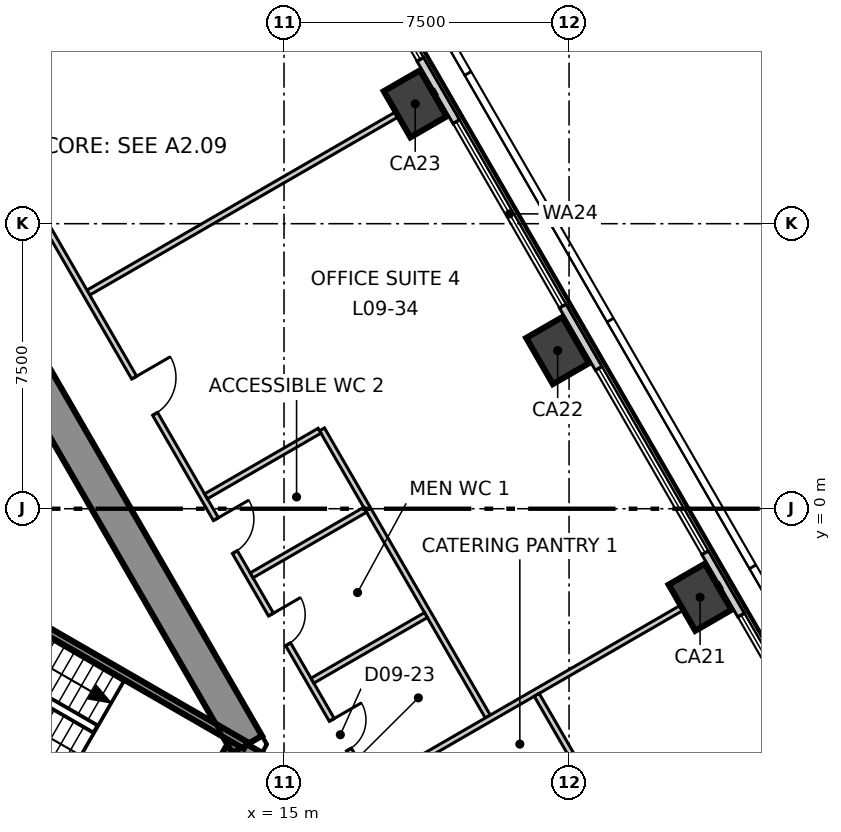
"""IFC4 building model, lengths in metres.
Left out: names, types, materials, properties, quantities, classifications, styles, units other than length and angle.
Written with IfcOpenShell. Run it as: python <this file> out.ifc"""

import sys

from ifc_helpers import new_model, si_unit, direction, frame, frame_2d, origin, origin_2d, place, context, subcontext, project, spatial, polyline, rectangle, outline, extrude, element, fill, save


model = new_model("IFC4")
c1 = context("Model", 3, precision=1e-05, world=origin(), true_north=direction((0.0, 1.0)))
c2 = subcontext(c1, "Body", "Model", "MODEL_VIEW")
j1 = project(units=[si_unit("LENGTHUNIT", "METRE"), si_unit("PLANEANGLEUNIT", "RADIAN")], contexts=[c1])
p1 = place(None, origin())
s1 = spatial("IfcSite", under=j1, at=p1, CompositionType="ELEMENT")
p2 = place(p1, origin())
s2 = spatial("IfcBuilding", under=s1, at=p2, CompositionType="ELEMENT")
p3 = place(p2, frame((0.0, 0.0, 47.3)))
s3 = spatial("IfcBuildingStorey", under=s2, at=p3, CompositionType="ELEMENT", Elevation=47.3)
p4 = place(p3, frame((12.384, -9.05, -0.3), z_axis=(0.0, 0.0, 1.0), x_axis=(0.500111984565, 0.865960739811, 0.0)))
e1 = element("IfcWall", 1, at=p4, inside=s3, PredefinedType="SHEAR", context=c2, shape_type="SweptSolid", body=[
    extrude(outline(polyline([(-0.26, -0.45), (1.646, -0.449), (3.551, -0.449), (3.031, 0.45), (1.646, 0.45), (0.26, 0.45), (-0.26, -0.45)])), origin(), (0.0, 0.0, 1.0), 4.0),
])
p5 = place(p4, frame((0.946, 0.0, 0.3)))
e2 = element("IfcOpeningElement", 2, at=p5, cuts=e1, PredefinedType="OPENING", context=c2, shape_type="SweptSolid", body=[
    extrude(rectangle(XDim=1.4, YDim=2.1, at=frame_2d((0.7, 1.05))), frame((0.0, 0.46, 0.0), z_axis=(0.0, -1.0, 0.0), x_axis=(1.0, 0.0, 0.0)), (0.0, 0.0, 1.0), 0.92),
])
p6 = place(p3, frame((14.03, -6.2, -0.3), z_axis=(0.0, 0.0, 1.0), x_axis=(-0.500026485275, 0.866010111964, 0.0)))
e3 = element("IfcWall", 3, at=p6, inside=s3, PredefinedType="SHEAR", context=c2, shape_type="SweptSolid", body=[
    extrude(outline(polyline([(-0.26, -0.449), (1.685, -0.449), (3.63, -0.449), (5.576, -0.449), (7.521, -0.449), (9.466, -0.449), (11.411, -0.449), (13.357, -0.449), (15.302, -0.449), (17.247, -0.45), (19.192, -0.45), (21.138, -0.45), (23.083, -0.45), (25.028, -0.45), (24.509, 0.449), (22.644, 0.449), (20.778, 0.449), (18.913, 0.449), (17.048, 0.449), (15.182, 0.449), (13.317, 0.449), (11.452, 0.449), (9.587, 0.449), (7.721, 0.45), (5.856, 0.45), (3.991, 0.45), (2.125, 0.45), (0.26, 0.45), (-0.26, -0.449)])), origin(), (0.0, 0.0, 1.0), 4.0),
])
p7 = place(p6, frame((11.484, 0.0, 0.3)))
e4 = element("IfcOpeningElement", 4, at=p7, cuts=e3, PredefinedType="OPENING", context=c2, shape_type="SweptSolid", body=[
    extrude(rectangle(XDim=1.8, YDim=2.1, at=frame_2d((0.9, 1.05))), frame((0.0, 0.46, 0.0), z_axis=(0.0, -1.0, 0.0), x_axis=(1.0, 0.0, 0.0)), (0.0, 0.0, 1.0), 0.92),
])
p8 = place(p6, frame((18.976, 0.0, 0.3)))
e5 = element("IfcOpeningElement", 5, at=p8, cuts=e3, PredefinedType="OPENING", context=c2, shape_type="SweptSolid", body=[
    extrude(rectangle(XDim=0.9, YDim=2.1, at=frame_2d((0.45, 1.05))), frame((0.0, 0.46, 0.0), z_axis=(0.0, -1.0, 0.0), x_axis=(1.0, 0.0, 0.0)), (0.0, 0.0, 1.0), 0.92),
])
for number, where, z_axis, x_axis in (
    (6, (25.948, -2.329, -0.3), (0.0, 0.0, 1.0), (-0.5, 0.866, 0.0)),
    (7, (22.2, 4.162, -0.3), (0.0, 0.0, 1.0), (-0.5, 0.866, 0.0)),
    (8, (18.452, 10.654, -0.3), (0.0, 0.0, 1.0), (-0.5, 0.866, 0.0)),
):
    element("IfcColumn", number, at=place(p3, frame(where, z_axis=z_axis, x_axis=x_axis)), inside=s3, PredefinedType="COLUMN", context=c2, shape_type="SweptSolid", body=[
        extrude(rectangle(XDim=1.4, YDim=1.1, at=origin_2d()), origin(), (0.0, 0.0, 1.0), 4.0),
    ])
p9 = place(p3, frame((34.701, -16.089, 0.0), z_axis=(0.0, 0.0, 1.0), x_axis=(-0.499998722828, 0.866026141159, 0.0)))
e9 = element("IfcWall", 9, at=p9, inside=s3, PredefinedType="ELEMENTEDWALL", context=c2, shape_type="SweptSolid", body=[
    extrude(rectangle(XDim=62.548, YDim=0.2, at=frame_2d((31.274, 0.0))), origin(), (0.0, 0.0, 1.0), 3.7),
])
p10 = place(p9, frame((2.25, 0.0, 0.9)))
e10 = element("IfcOpeningElement", 10, at=p10, cuts=e9, PredefinedType="OPENING", context=c2, shape_type="SweptSolid", body=[
    extrude(rectangle(XDim=5.6, YDim=2.5, at=frame_2d((2.8, 1.25))), frame((0.0, 0.11, 0.0), z_axis=(0.0, -1.0, 0.0), x_axis=(1.0, 0.0, 0.0)), (0.0, 0.0, 1.0), 0.22),
])
p11 = place(p9, frame((9.746, 0.0, 0.9)))
e11 = element("IfcOpeningElement", 11, at=p11, cuts=e9, PredefinedType="OPENING", context=c2, shape_type="SweptSolid", body=[
    extrude(rectangle(XDim=5.6, YDim=2.5, at=frame_2d((2.8, 1.25))), frame((0.0, 0.11, 0.0), z_axis=(0.0, -1.0, 0.0), x_axis=(1.0, 0.0, 0.0)), (0.0, 0.0, 1.0), 0.22),
])
p12 = place(p9, frame((17.241, 0.0, 0.9)))
e12 = element("IfcOpeningElement", 12, at=p12, cuts=e9, PredefinedType="OPENING", context=c2, shape_type="SweptSolid", body=[
    extrude(rectangle(XDim=5.6, YDim=2.5, at=frame_2d((2.8, 1.25))), frame((0.0, 0.11, 0.0), z_axis=(0.0, -1.0, 0.0), x_axis=(1.0, 0.0, 0.0)), (0.0, 0.0, 1.0), 0.22),
])
p13 = place(p9, frame((24.736, 0.0, 0.9)))
e13 = element("IfcOpeningElement", 13, at=p13, cuts=e9, PredefinedType="OPENING", context=c2, shape_type="SweptSolid", body=[
    extrude(rectangle(XDim=5.6, YDim=2.5, at=frame_2d((2.8, 1.25))), frame((0.0, 0.11, 0.0), z_axis=(0.0, -1.0, 0.0), x_axis=(1.0, 0.0, 0.0)), (0.0, 0.0, 1.0), 0.22),
])
p14 = place(p9, frame((32.232, 0.0, 0.9)))
e14 = element("IfcOpeningElement", 14, at=p14, cuts=e9, PredefinedType="OPENING", context=c2, shape_type="SweptSolid", body=[
    extrude(rectangle(XDim=5.6, YDim=2.5, at=frame_2d((2.8, 1.25))), frame((0.0, 0.11, 0.0), z_axis=(0.0, -1.0, 0.0), x_axis=(1.0, 0.0, 0.0)), (0.0, 0.0, 1.0), 0.22),
])
p15 = place(p9, frame((39.727, 0.0, 0.9)))
e15 = element("IfcOpeningElement", 15, at=p15, cuts=e9, PredefinedType="OPENING", context=c2, shape_type="SweptSolid", body=[
    extrude(rectangle(XDim=5.6, YDim=2.5, at=frame_2d((2.8, 1.25))), frame((0.0, 0.11, 0.0), z_axis=(0.0, -1.0, 0.0), x_axis=(1.0, 0.0, 0.0)), (0.0, 0.0, 1.0), 0.22),
])
p16 = place(p9, frame((47.222, 0.0, 0.9)))
e16 = element("IfcOpeningElement", 16, at=p16, cuts=e9, PredefinedType="OPENING", context=c2, shape_type="SweptSolid", body=[
    extrude(rectangle(XDim=5.6, YDim=2.5, at=frame_2d((2.8, 1.25))), frame((0.0, 0.11, 0.0), z_axis=(0.0, -1.0, 0.0), x_axis=(1.0, 0.0, 0.0)), (0.0, 0.0, 1.0), 0.22),
])
p17 = place(p9, frame((54.717, 0.0, 0.9)))
e17 = element("IfcOpeningElement", 17, at=p17, cuts=e9, PredefinedType="OPENING", context=c2, shape_type="SweptSolid", body=[
    extrude(rectangle(XDim=5.6, YDim=2.5, at=frame_2d((2.8, 1.25))), frame((0.0, 0.11, 0.0), z_axis=(0.0, -1.0, 0.0), x_axis=(1.0, 0.0, 0.0)), (0.0, 0.0, 1.0), 0.22),
])
p18 = place(p3, frame((9.851, 5.687, 0.0), z_axis=(0.0, 0.0, 1.0), x_axis=(0.865971732763, 0.500092949416, 0.0)))
e18 = element("IfcWall", 18, at=p18, inside=s3, PredefinedType="PARTITIONING", context=c2, shape_type="SweptSolid", body=[
    extrude(rectangle(XDim=10.552, YDim=0.15, at=frame_2d((5.276, 0.0))), origin(), (0.0, 0.0, 1.0), 3.2),
])
p19 = place(p3, frame((0.075, 22.47, 0.0), z_axis=(0.0, 0.0, 1.0), x_axis=(0.500002280369, -0.866024087209, 0.0)))
e19 = element("IfcWall", 19, at=p19, inside=s3, PredefinedType="PARTITIONING", context=c2, shape_type="SweptSolid", body=[
    extrude(rectangle(XDim=38.844, YDim=0.15, at=frame_2d((19.422, 0.0))), origin(), (0.0, 0.0, 1.0), 3.7),
])
p20 = place(p19, frame((36.244, 0.0, 0.0)))
e20 = element("IfcOpeningElement", 20, at=p20, cuts=e19, PredefinedType="OPENING", context=c2, shape_type="SweptSolid", body=[
    extrude(rectangle(XDim=1.0, YDim=2.1, at=frame_2d((0.5, 1.05))), frame((0.0, 0.085, 0.0), z_axis=(0.0, -1.0, 0.0), x_axis=(1.0, 0.0, 0.0)), (0.0, 0.0, 1.0), 0.17),
])
p21 = place(p19, frame((21.963, 0.0, 0.0)))
e21 = element("IfcOpeningElement", 21, at=p21, cuts=e19, PredefinedType="OPENING", context=c2, shape_type="SweptSolid", body=[
    extrude(rectangle(XDim=1.1, YDim=2.1, at=frame_2d((0.55, 1.05))), frame((0.0, 0.085, 0.0), z_axis=(0.0, -1.0, 0.0), x_axis=(1.0, 0.0, 0.0)), (0.0, 0.0, 1.0), 0.17),
])
p22 = place(p19, frame((32.363, 0.0, 0.0)))
e22 = element("IfcOpeningElement", 22, at=p22, cuts=e19, PredefinedType="OPENING", context=c2, shape_type="SweptSolid", body=[
    extrude(rectangle(XDim=0.9, YDim=2.1, at=frame_2d((0.45, 1.05))), frame((0.0, 0.085, 0.0), z_axis=(0.0, -1.0, 0.0), x_axis=(1.0, 0.0, 0.0)), (0.0, 0.0, 1.0), 0.17),
])
p23 = place(p19, frame((29.163, 0.0, 0.0)))
e23 = element("IfcOpeningElement", 23, at=p23, cuts=e19, PredefinedType="OPENING", context=c2, shape_type="SweptSolid", body=[
    extrude(rectangle(XDim=0.9, YDim=2.1, at=frame_2d((0.45, 1.05))), frame((0.0, 0.085, 0.0), z_axis=(0.0, -1.0, 0.0), x_axis=(1.0, 0.0, 0.0)), (0.0, 0.0, 1.0), 0.17),
])
p24 = place(p19, frame((26.263, 0.0, 0.0)))
e24 = element("IfcOpeningElement", 24, at=p24, cuts=e19, PredefinedType="OPENING", context=c2, shape_type="SweptSolid", body=[
    extrude(rectangle(XDim=1.0, YDim=2.1, at=frame_2d((0.5, 1.05))), frame((0.0, 0.085, 0.0), z_axis=(0.0, -1.0, 0.0), x_axis=(1.0, 0.0, 0.0)), (0.0, 0.0, 1.0), 0.17),
])
p25 = place(p19, frame((9.071, 0.0, 0.0)))
e25 = element("IfcOpeningElement", 25, at=p25, cuts=e19, PredefinedType="OPENING", context=c2, shape_type="SweptSolid", body=[
    extrude(rectangle(XDim=1.1, YDim=2.1, at=frame_2d((0.55, 1.05))), frame((0.0, 0.085, 0.0), z_axis=(0.0, -1.0, 0.0), x_axis=(1.0, 0.0, 0.0)), (0.0, 0.0, 1.0), 0.17),
])
p26 = place(p3, frame((15.999, 2.088, 0.0), z_axis=(0.0, 0.0, 1.0), x_axis=(0.500054279689, -0.865994063124, 0.0)))
e26 = element("IfcWall", 26, at=p26, inside=s3, PredefinedType="PARTITIONING", context=c2, shape_type="SweptSolid", body=[
    extrude(rectangle(XDim=8.725, YDim=0.15, at=frame_2d((4.363, 0.0))), origin(), (0.0, 0.0, 1.0), 3.7),
])
p27 = place(p3, frame((12.947, 0.326, 0.0), z_axis=(0.0, 0.0, 1.0), x_axis=(0.865960440485, 0.500112502858, 0.0)))
e27 = element("IfcWall", 27, at=p27, inside=s3, PredefinedType="PARTITIONING", context=c2, shape_type="SweptSolid", body=[
    extrude(rectangle(XDim=3.449, YDim=0.15, at=frame_2d((1.725, 0.0))), origin(), (0.0, 0.0, 1.0), 3.7),
])
p28 = place(p3, frame((14.147, -1.753, 0.0), z_axis=(0.0, 0.0, 1.0), x_axis=(0.865991092016, 0.500059425018, 0.0)))
e28 = element("IfcWall", 28, at=p28, inside=s3, PredefinedType="PARTITIONING", context=c2, shape_type="SweptSolid", body=[
    extrude(rectangle(XDim=3.449, YDim=0.15, at=frame_2d((1.725, 0.0))), origin(), (0.0, 0.0, 1.0), 3.7),
])
p29 = place(p3, frame((15.747, -4.524, 0.0), z_axis=(0.0, 0.0, 1.0), x_axis=(0.865973391227, 0.500090077572, 0.0)))
e29 = element("IfcWall", 29, at=p29, inside=s3, PredefinedType="PARTITIONING", context=c2, shape_type="SweptSolid", body=[
    extrude(rectangle(XDim=3.449, YDim=0.15, at=frame_2d((1.725, 0.0))), origin(), (0.0, 0.0, 1.0), 3.7),
])
p30 = place(p3, frame((17.347, -7.295, 0.0), z_axis=(0.0, 0.0, 1.0), x_axis=(0.866027613664, 0.499996172356, 0.0)))
e30 = element("IfcWall", 30, at=p30, inside=s3, PredefinedType="PARTITIONING", context=c2, shape_type="SweptSolid", body=[
    extrude(rectangle(XDim=10.552, YDim=0.15, at=frame_2d((5.276, 0.0))), origin(), (0.0, 0.0, 1.0), 3.7),
])
p31 = place(p3, frame((21.649, -4.898, 0.0), z_axis=(0.0, 0.0, 1.0), x_axis=(0.500222323776, -0.865897007037, 0.0)))
e31 = element("IfcWall", 31, at=p31, inside=s3, PredefinedType="PARTITIONING", context=c2, shape_type="SweptSolid", body=[
    extrude(rectangle(XDim=2.649, YDim=0.15, at=frame_2d((1.325, 0.0))), origin(), (0.0, 0.0, 1.0), 3.7),
])
p32 = place(p3, frame((4.929, -4.693, 0.0), z_axis=(0.0, 0.0, 1.0), x_axis=(0.866010975815, -0.500024989144, 0.0)))
e32 = element("IfcWall", 32, at=p32, inside=s3, PredefinedType="SOLIDWALL", context=c2, shape_type="SweptSolid", body=[
    extrude(rectangle(XDim=8.615, YDim=0.2, at=frame_2d((4.308, 0.0))), origin(), (0.0, 0.0, 1.0), 3.7),
])
p33 = place(p3, frame((6.529, -1.922, 0.0), z_axis=(0.0, 0.0, 1.0), x_axis=(0.866060059011, -0.499939970583, 0.0)))
e33 = element("IfcWall", 33, at=p33, inside=s3, PredefinedType="SOLIDWALL", context=c2, shape_type="SweptSolid", body=[
    extrude(rectangle(XDim=8.615, YDim=0.2, at=frame_2d((4.307, 0.0))), origin(), (0.0, 0.0, 1.0), 3.7),
])
p34 = place(p11, origin())
e34 = element("IfcWindow", 34, at=p34, inside=s3, PartitioningType="SINGLE_PANEL", PredefinedType="WINDOW", context=c2, shape_type="SweptSolid", body=[
    extrude(rectangle(XDim=5.6, YDim=2.5, at=frame_2d((2.8, 1.25))), frame((0.0, 0.03, 0.0), z_axis=(0.0, -1.0, 0.0), x_axis=(1.0, 0.0, 0.0)), (0.0, 0.0, 1.0), 0.06),
])
fill(e11, e34)
p35 = place(p12, origin())
e35 = element("IfcWindow", 35, at=p35, inside=s3, PartitioningType="SINGLE_PANEL", PredefinedType="WINDOW", context=c2, shape_type="SweptSolid", body=[
    extrude(rectangle(XDim=5.6, YDim=2.5, at=frame_2d((2.8, 1.25))), frame((0.0, 0.03, 0.0), z_axis=(0.0, -1.0, 0.0), x_axis=(1.0, 0.0, 0.0)), (0.0, 0.0, 1.0), 0.06),
])
fill(e12, e35)
p36 = place(p13, origin())
e36 = element("IfcWindow", 36, at=p36, inside=s3, PartitioningType="SINGLE_PANEL", PredefinedType="WINDOW", context=c2, shape_type="SweptSolid", body=[
    extrude(rectangle(XDim=5.6, YDim=2.5, at=frame_2d((2.8, 1.25))), frame((0.0, 0.03, 0.0), z_axis=(0.0, -1.0, 0.0), x_axis=(1.0, 0.0, 0.0)), (0.0, 0.0, 1.0), 0.06),
])
fill(e13, e36)
p37 = place(p14, origin())
e37 = element("IfcWindow", 37, at=p37, inside=s3, PartitioningType="SINGLE_PANEL", PredefinedType="WINDOW", context=c2, shape_type="SweptSolid", body=[
    extrude(rectangle(XDim=5.6, YDim=2.5, at=frame_2d((2.8, 1.25))), frame((0.0, 0.03, 0.0), z_axis=(0.0, -1.0, 0.0), x_axis=(1.0, 0.0, 0.0)), (0.0, 0.0, 1.0), 0.06),
])
fill(e14, e37)
p38 = place(p21, origin())
e38 = element("IfcDoor", 38, at=p38, inside=s3, OperationType="SINGLE_SWING_RIGHT", PredefinedType="DOOR", context=c2, shape_type="SweptSolid", body=[
    extrude(rectangle(XDim=1.1, YDim=2.1, at=frame_2d((0.55, 1.05))), frame((0.0, 0.025, 0.0), z_axis=(0.0, -1.0, 0.0), x_axis=(1.0, 0.0, 0.0)), (0.0, 0.0, 1.0), 0.05),
])
fill(e21, e38)
p39 = place(p22, origin())
e39 = element("IfcDoor", 39, at=p39, inside=s3, OperationType="SINGLE_SWING_RIGHT", PredefinedType="DOOR", context=c2, shape_type="SweptSolid", body=[
    extrude(rectangle(XDim=0.9, YDim=2.1, at=frame_2d((0.45, 1.05))), frame((0.0, 0.025, 0.0), z_axis=(0.0, -1.0, 0.0), x_axis=(1.0, 0.0, 0.0)), (0.0, 0.0, 1.0), 0.05),
])
fill(e22, e39)
p40 = place(p23, origin())
e40 = element("IfcDoor", 40, at=p40, inside=s3, OperationType="SINGLE_SWING_RIGHT", PredefinedType="DOOR", context=c2, shape_type="SweptSolid", body=[
    extrude(rectangle(XDim=0.9, YDim=2.1, at=frame_2d((0.45, 1.05))), frame((0.0, 0.025, 0.0), z_axis=(0.0, -1.0, 0.0), x_axis=(1.0, 0.0, 0.0)), (0.0, 0.0, 1.0), 0.05),
])
fill(e23, e40)
p41 = place(p24, origin())
e41 = element("IfcDoor", 41, at=p41, inside=s3, OperationType="SINGLE_SWING_RIGHT", PredefinedType="DOOR", context=c2, shape_type="SweptSolid", body=[
    extrude(rectangle(XDim=1.0, YDim=2.1, at=frame_2d((0.5, 1.05))), frame((0.0, 0.025, 0.0), z_axis=(0.0, -1.0, 0.0), x_axis=(1.0, 0.0, 0.0)), (0.0, 0.0, 1.0), 0.05),
])
fill(e24, e41)
save(model, sys.argv[1])
